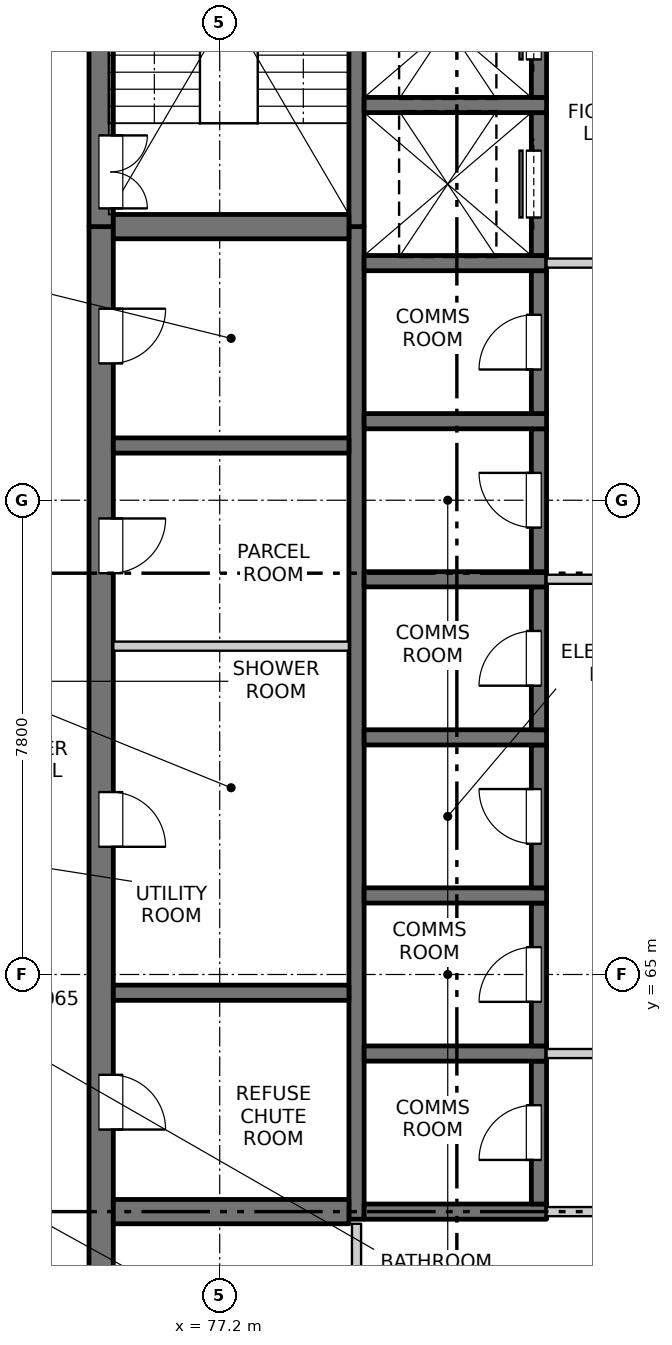
"""IFC4 building model, lengths in metres.
Left out: names, types, materials, properties, quantities, classifications, styles, units other than length and angle.
Written with IfcOpenShell. Run it as: python <this file> out.ifc"""

import sys

from ifc_helpers import new_model, si_unit, direction, frame, frame_2d, origin, place, context, subcontext, project, spatial, rectangle, extrude, element, fill, save


model = new_model("IFC4")
c1 = context("Model", 3, precision=1e-05, world=origin(), true_north=direction((0.0, 1.0)))
c2 = subcontext(c1, "Body", "Model", "MODEL_VIEW")
j1 = project(units=[si_unit("LENGTHUNIT", "METRE"), si_unit("PLANEANGLEUNIT", "RADIAN")], contexts=[c1])
p1 = place(None, origin())
s1 = spatial("IfcSite", under=j1, at=p1, CompositionType="ELEMENT")
p2 = place(p1, origin())
s2 = spatial("IfcBuilding", under=s1, at=p2, CompositionType="ELEMENT")
p3 = place(p2, frame((0.0, 0.0, 238.1)))
s3 = spatial("IfcBuildingStorey", under=s2, at=p3, CompositionType="ELEMENT", Elevation=238.1)
p4 = place(p3, frame((75.25, 55.05, -0.25), z_axis=(0.0, 0.0, 1.0), x_axis=(0.0, 1.0, 0.0)))
e1 = element("IfcWall", 1, at=p4, inside=s3, PredefinedType="SOLIDWALL", context=c2, shape_type="SweptSolid", body=[
    extrude(rectangle(XDim=22.25, YDim=0.4, at=frame_2d((11.125, 0.0))), origin(), (0.0, 0.0, 1.0), 3.35),
])
p5 = place(p4, frame((7.4, 0.0, 0.25)))
e2 = element("IfcOpeningElement", 2, at=p5, cuts=e1, PredefinedType="OPENING", context=c2, shape_type="SweptSolid", body=[
    extrude(rectangle(XDim=0.9, YDim=2.1, at=frame_2d((0.45, 1.05))), frame((0.0, 0.21, 0.0), z_axis=(0.0, -1.0, 0.0), x_axis=(1.0, 0.0, 0.0)), (0.0, 0.0, 1.0), 0.42),
])
p6 = place(p4, frame((12.05, 0.0, 0.25)))
e3 = element("IfcOpeningElement", 3, at=p6, cuts=e1, PredefinedType="OPENING", context=c2, shape_type="SweptSolid", body=[
    extrude(rectangle(XDim=0.9, YDim=2.1, at=frame_2d((0.45, 1.05))), frame((0.0, 0.21, 0.0), z_axis=(0.0, -1.0, 0.0), x_axis=(1.0, 0.0, 0.0)), (0.0, 0.0, 1.0), 0.42),
])
p7 = place(p4, frame((16.55, 0.0, 0.25)))
e4 = element("IfcOpeningElement", 4, at=p7, cuts=e1, PredefinedType="OPENING", context=c2, shape_type="SweptSolid", body=[
    extrude(rectangle(XDim=0.9, YDim=2.1, at=frame_2d((0.45, 1.05))), frame((0.0, 0.21, 0.0), z_axis=(0.0, -1.0, 0.0), x_axis=(1.0, 0.0, 0.0)), (0.0, 0.0, 1.0), 0.42),
])
p8 = place(p4, frame((20.0, 0.0, 0.25)))
e5 = element("IfcOpeningElement", 5, at=p8, cuts=e1, PredefinedType="OPENING", context=c2, shape_type="SweptSolid", body=[
    extrude(rectangle(XDim=0.9, YDim=2.1, at=frame_2d((0.45, 1.05))), frame((0.0, 0.21, 0.0), z_axis=(0.0, -1.0, 0.0), x_axis=(1.0, 0.0, 0.0)), (0.0, 0.0, 1.0), 0.42),
])
p9 = place(p3, frame((75.25, 77.3, -0.25), z_axis=(0.0, 0.0, 1.0), x_axis=(0.0, 1.0, 0.0)))
e6 = element("IfcWall", 6, at=p9, inside=s3, PredefinedType="SOLIDWALL", context=c2, shape_type="SweptSolid", body=[
    extrude(rectangle(XDim=7.4, YDim=0.4, at=frame_2d((3.7, 0.0))), origin(), (0.0, 0.0, 1.0), 3.35),
])
p10 = place(p9, frame((0.3, 0.0, 0.25)))
e7 = element("IfcOpeningElement", 7, at=p10, cuts=e6, PredefinedType="OPENING", context=c2, shape_type="SweptSolid", body=[
    extrude(rectangle(XDim=1.2, YDim=2.1, at=frame_2d((0.6, 1.05))), frame((0.0, 0.21, 0.0), z_axis=(0.0, -1.0, 0.0), x_axis=(1.0, 0.0, 0.0)), (0.0, 0.0, 1.0), 0.42),
])
p11 = place(p3, frame((79.45, 60.975, -0.25), z_axis=(0.0, 0.0, 1.0), x_axis=(0.0, 1.0, 0.0)))
e8 = element("IfcWall", 8, at=p11, inside=s3, PredefinedType="SOLIDWALL", context=c2, shape_type="SweptSolid", body=[
    extrude(rectangle(XDim=16.325, YDim=0.25, at=frame_2d((8.163, 0.0))), origin(), (0.0, 0.0, 1.0), 3.35),
])
p12 = place(p3, frame((79.45, 77.3, -0.25), z_axis=(0.0, 0.0, 1.0), x_axis=(0.0, 1.0, 0.0)))
e9 = element("IfcWall", 9, at=p12, inside=s3, PredefinedType="SOLIDWALL", context=c2, shape_type="SweptSolid", body=[
    extrude(rectangle(XDim=7.0, YDim=0.25, at=frame_2d((3.5, 0.0))), origin(), (0.0, 0.0, 1.0), 3.35),
])
p13 = place(p3, frame((79.575, 61.1, -0.25), z_axis=(0.0, 0.0, 1.0), x_axis=(1.0, 0.0, 0.0)))
e10 = element("IfcWall", 10, at=p13, inside=s3, PredefinedType="SOLIDWALL", context=c2, shape_type="SweptSolid", body=[
    extrude(rectangle(XDim=3.0, YDim=0.25, at=frame_2d((1.5, 0.0))), origin(), (0.0, 0.0, 1.0), 3.35),
])
p14 = place(p3, frame((82.45, 61.225, -0.25), z_axis=(0.0, 0.0, 1.0), x_axis=(0.0, 1.0, 0.0)))
e11 = element("IfcWall", 11, at=p14, inside=s3, PredefinedType="SOLIDWALL", context=c2, shape_type="SweptSolid", body=[
    extrude(rectangle(XDim=2.35, YDim=0.25, at=frame_2d((1.175, 0.0))), origin(), (0.0, 0.0, 1.0), 3.35),
])
p15 = place(p14, frame((0.725, 0.0, 0.25)))
e12 = element("IfcOpeningElement", 12, at=p15, cuts=e11, PredefinedType="OPENING", context=c2, shape_type="SweptSolid", body=[
    extrude(rectangle(XDim=0.9, YDim=2.1, at=frame_2d((0.45, 1.05))), frame((0.0, 0.135, 0.0), z_axis=(0.0, -1.0, 0.0), x_axis=(1.0, 0.0, 0.0)), (0.0, 0.0, 1.0), 0.27),
])
p16 = place(p3, frame((79.575, 63.7, -0.25), z_axis=(0.0, 0.0, 1.0), x_axis=(1.0, 0.0, 0.0)))
e13 = element("IfcWall", 13, at=p16, inside=s3, PredefinedType="SOLIDWALL", context=c2, shape_type="SweptSolid", body=[
    extrude(rectangle(XDim=3.0, YDim=0.25, at=frame_2d((1.5, 0.0))), origin(), (0.0, 0.0, 1.0), 3.35),
])
p17 = place(p3, frame((82.45, 63.825, -0.25), z_axis=(0.0, 0.0, 1.0), x_axis=(0.0, 1.0, 0.0)))
e14 = element("IfcWall", 14, at=p17, inside=s3, PredefinedType="SOLIDWALL", context=c2, shape_type="SweptSolid", body=[
    extrude(rectangle(XDim=2.35, YDim=0.25, at=frame_2d((1.175, 0.0))), origin(), (0.0, 0.0, 1.0), 3.35),
])
p18 = place(p17, frame((0.725, 0.0, 0.25)))
e15 = element("IfcOpeningElement", 15, at=p18, cuts=e14, PredefinedType="OPENING", context=c2, shape_type="SweptSolid", body=[
    extrude(rectangle(XDim=0.9, YDim=2.1, at=frame_2d((0.45, 1.05))), frame((0.0, 0.135, 0.0), z_axis=(0.0, -1.0, 0.0), x_axis=(1.0, 0.0, 0.0)), (0.0, 0.0, 1.0), 0.27),
])
p19 = place(p3, frame((79.575, 66.3, -0.25), z_axis=(0.0, 0.0, 1.0), x_axis=(1.0, 0.0, 0.0)))
e16 = element("IfcWall", 16, at=p19, inside=s3, PredefinedType="SOLIDWALL", context=c2, shape_type="SweptSolid", body=[
    extrude(rectangle(XDim=3.0, YDim=0.25, at=frame_2d((1.5, 0.0))), origin(), (0.0, 0.0, 1.0), 3.35),
])
p20 = place(p3, frame((82.45, 66.425, -0.25), z_axis=(0.0, 0.0, 1.0), x_axis=(0.0, 1.0, 0.0)))
e17 = element("IfcWall", 17, at=p20, inside=s3, PredefinedType="SOLIDWALL", context=c2, shape_type="SweptSolid", body=[
    extrude(rectangle(XDim=2.35, YDim=0.25, at=frame_2d((1.175, 0.0))), origin(), (0.0, 0.0, 1.0), 3.35),
])
p21 = place(p20, frame((0.725, 0.0, 0.25)))
e18 = element("IfcOpeningElement", 18, at=p21, cuts=e17, PredefinedType="OPENING", context=c2, shape_type="SweptSolid", body=[
    extrude(rectangle(XDim=0.9, YDim=2.1, at=frame_2d((0.45, 1.05))), frame((0.0, 0.135, 0.0), z_axis=(0.0, -1.0, 0.0), x_axis=(1.0, 0.0, 0.0)), (0.0, 0.0, 1.0), 0.27),
])
p22 = place(p3, frame((79.575, 68.9, -0.25), z_axis=(0.0, 0.0, 1.0), x_axis=(1.0, 0.0, 0.0)))
e19 = element("IfcWall", 19, at=p22, inside=s3, PredefinedType="SOLIDWALL", context=c2, shape_type="SweptSolid", body=[
    extrude(rectangle(XDim=3.0, YDim=0.25, at=frame_2d((1.5, 0.0))), origin(), (0.0, 0.0, 1.0), 3.35),
])
p23 = place(p3, frame((82.45, 69.025, -0.25), z_axis=(0.0, 0.0, 1.0), x_axis=(0.0, 1.0, 0.0)))
e20 = element("IfcWall", 20, at=p23, inside=s3, PredefinedType="SOLIDWALL", context=c2, shape_type="SweptSolid", body=[
    extrude(rectangle(XDim=2.35, YDim=0.25, at=frame_2d((1.175, 0.0))), origin(), (0.0, 0.0, 1.0), 3.35),
])
p24 = place(p23, frame((0.725, 0.0, 0.25)))
e21 = element("IfcOpeningElement", 21, at=p24, cuts=e20, PredefinedType="OPENING", context=c2, shape_type="SweptSolid", body=[
    extrude(rectangle(XDim=0.9, YDim=2.1, at=frame_2d((0.45, 1.05))), frame((0.0, 0.135, 0.0), z_axis=(0.0, -1.0, 0.0), x_axis=(1.0, 0.0, 0.0)), (0.0, 0.0, 1.0), 0.27),
])
p25 = place(p3, frame((79.575, 71.5, -0.25), z_axis=(0.0, 0.0, 1.0), x_axis=(1.0, 0.0, 0.0)))
e22 = element("IfcWall", 22, at=p25, inside=s3, PredefinedType="SOLIDWALL", context=c2, shape_type="SweptSolid", body=[
    extrude(rectangle(XDim=3.0, YDim=0.25, at=frame_2d((1.5, 0.0))), origin(), (0.0, 0.0, 1.0), 3.35),
])
p26 = place(p3, frame((82.45, 71.625, -0.25), z_axis=(0.0, 0.0, 1.0), x_axis=(0.0, 1.0, 0.0)))
e23 = element("IfcWall", 23, at=p26, inside=s3, PredefinedType="SOLIDWALL", context=c2, shape_type="SweptSolid", body=[
    extrude(rectangle(XDim=2.35, YDim=0.25, at=frame_2d((1.175, 0.0))), origin(), (0.0, 0.0, 1.0), 3.35),
])
p27 = place(p26, frame((0.725, 0.0, 0.25)))
e24 = element("IfcOpeningElement", 24, at=p27, cuts=e23, PredefinedType="OPENING", context=c2, shape_type="SweptSolid", body=[
    extrude(rectangle(XDim=0.9, YDim=2.1, at=frame_2d((0.45, 1.05))), frame((0.0, 0.135, 0.0), z_axis=(0.0, -1.0, 0.0), x_axis=(1.0, 0.0, 0.0)), (0.0, 0.0, 1.0), 0.27),
])
p28 = place(p3, frame((79.575, 74.1, -0.25), z_axis=(0.0, 0.0, 1.0), x_axis=(1.0, 0.0, 0.0)))
e25 = element("IfcWall", 25, at=p28, inside=s3, PredefinedType="SOLIDWALL", context=c2, shape_type="SweptSolid", body=[
    extrude(rectangle(XDim=3.0, YDim=0.25, at=frame_2d((1.5, 0.0))), origin(), (0.0, 0.0, 1.0), 3.35),
])
p29 = place(p3, frame((82.45, 74.225, -0.25), z_axis=(0.0, 0.0, 1.0), x_axis=(0.0, 1.0, 0.0)))
e26 = element("IfcWall", 26, at=p29, inside=s3, PredefinedType="SOLIDWALL", context=c2, shape_type="SweptSolid", body=[
    extrude(rectangle(XDim=2.35, YDim=0.25, at=frame_2d((1.175, 0.0))), origin(), (0.0, 0.0, 1.0), 3.35),
])
p30 = place(p29, frame((0.725, 0.0, 0.25)))
e27 = element("IfcOpeningElement", 27, at=p30, cuts=e26, PredefinedType="OPENING", context=c2, shape_type="SweptSolid", body=[
    extrude(rectangle(XDim=0.9, YDim=2.1, at=frame_2d((0.45, 1.05))), frame((0.0, 0.135, 0.0), z_axis=(0.0, -1.0, 0.0), x_axis=(1.0, 0.0, 0.0)), (0.0, 0.0, 1.0), 0.27),
])
p31 = place(p3, frame((79.575, 76.7, -0.25), z_axis=(0.0, 0.0, 1.0), x_axis=(1.0, 0.0, 0.0)))
e28 = element("IfcWall", 28, at=p31, inside=s3, PredefinedType="SOLIDWALL", context=c2, shape_type="SweptSolid", body=[
    extrude(rectangle(XDim=3.0, YDim=0.25, at=frame_2d((1.5, 0.0))), origin(), (0.0, 0.0, 1.0), 3.35),
])
p32 = place(p3, frame((82.45, 76.825, -0.25), z_axis=(0.0, 0.0, 1.0), x_axis=(0.0, 1.0, 0.0)))
e29 = element("IfcWall", 29, at=p32, inside=s3, PredefinedType="SOLIDWALL", context=c2, shape_type="SweptSolid", body=[
    extrude(rectangle(XDim=2.35, YDim=0.25, at=frame_2d((1.175, 0.0))), origin(), (0.0, 0.0, 1.0), 3.35),
])
p33 = place(p32, frame((0.625, 0.0, 0.25)))
e30 = element("IfcOpeningElement", 30, at=p33, cuts=e29, PredefinedType="OPENING", context=c2, shape_type="SweptSolid", body=[
    extrude(rectangle(XDim=1.1, YDim=2.1, at=frame_2d((0.55, 1.05))), frame((0.0, 0.135, 0.0), z_axis=(0.0, -1.0, 0.0), x_axis=(1.0, 0.0, 0.0)), (0.0, 0.0, 1.0), 0.27),
])
p34 = place(p3, frame((79.575, 79.3, -0.25), z_axis=(0.0, 0.0, 1.0), x_axis=(1.0, 0.0, 0.0)))
e31 = element("IfcWall", 31, at=p34, inside=s3, PredefinedType="SOLIDWALL", context=c2, shape_type="SweptSolid", body=[
    extrude(rectangle(XDim=3.0, YDim=0.25, at=frame_2d((1.5, 0.0))), origin(), (0.0, 0.0, 1.0), 3.35),
])
p35 = place(p3, frame((82.45, 79.425, -0.25), z_axis=(0.0, 0.0, 1.0), x_axis=(0.0, 1.0, 0.0)))
e32 = element("IfcWall", 32, at=p35, inside=s3, PredefinedType="SOLIDWALL", context=c2, shape_type="SweptSolid", body=[
    extrude(rectangle(XDim=2.35, YDim=0.25, at=frame_2d((1.175, 0.0))), origin(), (0.0, 0.0, 1.0), 3.35),
])
p36 = place(p35, frame((0.625, 0.0, 0.25)))
e33 = element("IfcOpeningElement", 33, at=p36, cuts=e32, PredefinedType="OPENING", context=c2, shape_type="SweptSolid", body=[
    extrude(rectangle(XDim=1.1, YDim=2.1, at=frame_2d((0.55, 1.05))), frame((0.0, 0.135, 0.0), z_axis=(0.0, -1.0, 0.0), x_axis=(1.0, 0.0, 0.0)), (0.0, 0.0, 1.0), 0.27),
])
p37 = place(p3, frame((75.45, 61.1, -0.25), z_axis=(0.0, 0.0, 1.0), x_axis=(1.0, 0.0, 0.0)))
e34 = element("IfcWall", 34, at=p37, inside=s3, PredefinedType="SOLIDWALL", context=c2, shape_type="SweptSolid", body=[
    extrude(rectangle(XDim=3.875, YDim=0.4, at=frame_2d((1.938, 0.0))), origin(), (0.0, 0.0, 1.0), 3.35),
])
for number, where, z_axis, x_axis in (
    (35, (75.45, 64.7, -0.25), (0.0, 0.0, 1.0), (1.0, 0.0, 0.0)),
    (36, (75.45, 73.7, -0.25), (0.0, 0.0, 1.0), (1.0, 0.0, 0.0)),
):
    element("IfcWall", number, at=place(p3, frame(where, z_axis=z_axis, x_axis=x_axis)), inside=s3, PredefinedType="SOLIDWALL", context=c2, shape_type="SweptSolid", body=[
        extrude(rectangle(XDim=3.875, YDim=0.25, at=frame_2d((1.938, 0.0))), origin(), (0.0, 0.0, 1.0), 3.35),
    ])
p38 = place(p3, frame((75.45, 77.3, -0.25), z_axis=(0.0, 0.0, 1.0), x_axis=(1.0, 0.0, 0.0)))
e37 = element("IfcWall", 37, at=p38, inside=s3, PredefinedType="SOLIDWALL", context=c2, shape_type="SweptSolid", body=[
    extrude(rectangle(XDim=3.875, YDim=0.4, at=frame_2d((1.938, 0.0))), origin(), (0.0, 0.0, 1.0), 3.35),
])
p39 = place(p3, frame((82.575, 61.1, 0.0), z_axis=(0.0, 0.0, 1.0), x_axis=(1.0, 0.0, 0.0)))
e38 = element("IfcWall", 38, at=p39, inside=s3, PredefinedType="PARTITIONING", context=c2, shape_type="SweptSolid", body=[
    extrude(rectangle(XDim=4.85, YDim=0.15, at=frame_2d((2.425, 0.0))), origin(), (0.0, 0.0, 1.0), 3.1),
])
p40 = place(p39, frame((1.525, 0.0, 0.0)))
e39 = element("IfcOpeningElement", 39, at=p40, cuts=e38, PredefinedType="OPENING", context=c2, shape_type="SweptSolid", body=[
    extrude(rectangle(XDim=1.8, YDim=2.1, at=frame_2d((0.9, 1.05))), frame((0.0, 0.085, 0.0), z_axis=(0.0, -1.0, 0.0), x_axis=(1.0, 0.0, 0.0)), (0.0, 0.0, 1.0), 0.17),
])
p41 = place(p3, frame((82.575, 63.7, 0.0), z_axis=(0.0, 0.0, 1.0), x_axis=(1.0, 0.0, 0.0)))
e40 = element("IfcWall", 40, at=p41, inside=s3, PredefinedType="PARTITIONING", context=c2, shape_type="SweptSolid", body=[
    extrude(rectangle(XDim=4.85, YDim=0.15, at=frame_2d((2.425, 0.0))), origin(), (0.0, 0.0, 1.0), 3.1),
])
p42 = place(p41, frame((1.525, 0.0, 0.0)))
e41 = element("IfcOpeningElement", 41, at=p42, cuts=e40, PredefinedType="OPENING", context=c2, shape_type="SweptSolid", body=[
    extrude(rectangle(XDim=1.8, YDim=2.1, at=frame_2d((0.9, 1.05))), frame((0.0, 0.085, 0.0), z_axis=(0.0, -1.0, 0.0), x_axis=(1.0, 0.0, 0.0)), (0.0, 0.0, 1.0), 0.17),
])
p43 = place(p3, frame((75.45, 70.4, 0.0), z_axis=(0.0, 0.0, 1.0), x_axis=(1.0, 0.0, 0.0)))
e42 = element("IfcWall", 42, at=p43, inside=s3, PredefinedType="PARTITIONING", context=c2, shape_type="SweptSolid", body=[
    extrude(rectangle(XDim=3.875, YDim=0.15, at=frame_2d((1.938, 0.0))), origin(), (0.0, 0.0, 1.0), 3.1),
])
p44 = place(p3, frame((82.575, 71.5, 0.0), z_axis=(0.0, 0.0, 1.0), x_axis=(1.0, 0.0, 0.0)))
e43 = element("IfcWall", 43, at=p44, inside=s3, PredefinedType="PARTITIONING", context=c2, shape_type="SweptSolid", body=[
    extrude(rectangle(XDim=4.85, YDim=0.15, at=frame_2d((2.425, 0.0))), origin(), (0.0, 0.0, 1.0), 3.1),
])
p45 = place(p44, frame((1.525, 0.0, 0.0)))
e44 = element("IfcOpeningElement", 44, at=p45, cuts=e43, PredefinedType="OPENING", context=c2, shape_type="SweptSolid", body=[
    extrude(rectangle(XDim=1.8, YDim=2.1, at=frame_2d((0.9, 1.05))), frame((0.0, 0.085, 0.0), z_axis=(0.0, -1.0, 0.0), x_axis=(1.0, 0.0, 0.0)), (0.0, 0.0, 1.0), 0.17),
])
p46 = place(p3, frame((82.575, 76.7, 0.0), z_axis=(0.0, 0.0, 1.0), x_axis=(1.0, 0.0, 0.0)))
e45 = element("IfcWall", 45, at=p46, inside=s3, PredefinedType="PARTITIONING", context=c2, shape_type="SweptSolid", body=[
    extrude(rectangle(XDim=4.85, YDim=0.15, at=frame_2d((2.425, 0.0))), origin(), (0.0, 0.0, 1.0), 3.1),
])
p47 = place(p46, frame((1.525, 0.0, 0.0)))
e46 = element("IfcOpeningElement", 46, at=p47, cuts=e45, PredefinedType="OPENING", context=c2, shape_type="SweptSolid", body=[
    extrude(rectangle(XDim=1.8, YDim=2.1, at=frame_2d((0.9, 1.05))), frame((0.0, 0.085, 0.0), z_axis=(0.0, -1.0, 0.0), x_axis=(1.0, 0.0, 0.0)), (0.0, 0.0, 1.0), 0.17),
])
p48 = place(p3, frame((79.45, 55.45, 0.0), z_axis=(0.0, 0.0, 1.0), x_axis=(0.0, 1.0, 0.0)))
e47 = element("IfcWall", 47, at=p48, inside=s3, PredefinedType="PARTITIONING", context=c2, shape_type="SweptSolid", body=[
    extrude(rectangle(XDim=5.45, YDim=0.15, at=frame_2d((2.725, 0.0))), origin(), (0.0, 0.0, 1.0), 3.1),
])
p49 = place(p48, frame((2.25, 0.0, 0.0)))
e48 = element("IfcOpeningElement", 48, at=p49, cuts=e47, PredefinedType="OPENING", context=c2, shape_type="SweptSolid", body=[
    extrude(rectangle(XDim=0.9, YDim=2.1, at=frame_2d((0.45, 1.05))), frame((0.0, 0.085, 0.0), z_axis=(0.0, -1.0, 0.0), x_axis=(1.0, 0.0, 0.0)), (0.0, 0.0, 1.0), 0.17),
])
p50 = place(p15, origin())
e49 = element("IfcDoor", 49, at=p50, inside=s3, OperationType="SINGLE_SWING_LEFT", PredefinedType="DOOR", context=c2, shape_type="SweptSolid", body=[
    extrude(rectangle(XDim=0.9, YDim=2.1, at=frame_2d((0.45, 1.05))), frame((0.0, 0.11, 0.0), z_axis=(0.0, -1.0, 0.0), x_axis=(1.0, 0.0, 0.0)), (0.0, 0.0, 1.0), 0.05),
])
fill(e12, e49)
p51 = place(p5, origin())
e50 = element("IfcDoor", 50, at=p51, inside=s3, OperationType="SINGLE_SWING_RIGHT", PredefinedType="DOOR", context=c2, shape_type="SweptSolid", body=[
    extrude(rectangle(XDim=0.9, YDim=2.1, at=frame_2d((0.45, 1.05))), frame((0.0, -0.135, 0.0), z_axis=(0.0, -1.0, 0.0), x_axis=(1.0, 0.0, 0.0)), (0.0, 0.0, 1.0), 0.05),
])
fill(e2, e50)
p52 = place(p18, origin())
e51 = element("IfcDoor", 51, at=p52, inside=s3, OperationType="SINGLE_SWING_LEFT", PredefinedType="DOOR", context=c2, shape_type="SweptSolid", body=[
    extrude(rectangle(XDim=0.9, YDim=2.1, at=frame_2d((0.45, 1.05))), frame((0.0, 0.11, 0.0), z_axis=(0.0, -1.0, 0.0), x_axis=(1.0, 0.0, 0.0)), (0.0, 0.0, 1.0), 0.05),
])
fill(e15, e51)
p53 = place(p6, origin())
e52 = element("IfcDoor", 52, at=p53, inside=s3, OperationType="SINGLE_SWING_RIGHT", PredefinedType="DOOR", context=c2, shape_type="SweptSolid", body=[
    extrude(rectangle(XDim=0.9, YDim=2.1, at=frame_2d((0.45, 1.05))), frame((0.0, -0.135, 0.0), z_axis=(0.0, -1.0, 0.0), x_axis=(1.0, 0.0, 0.0)), (0.0, 0.0, 1.0), 0.05),
])
fill(e3, e52)
p54 = place(p21, origin())
e53 = element("IfcDoor", 53, at=p54, inside=s3, OperationType="SINGLE_SWING_RIGHT", PredefinedType="DOOR", context=c2, shape_type="SweptSolid", body=[
    extrude(rectangle(XDim=0.9, YDim=2.1, at=frame_2d((0.45, 1.05))), frame((0.0, 0.11, 0.0), z_axis=(0.0, -1.0, 0.0), x_axis=(1.0, 0.0, 0.0)), (0.0, 0.0, 1.0), 0.05),
])
fill(e18, e53)
p55 = place(p24, origin())
e54 = element("IfcDoor", 54, at=p55, inside=s3, OperationType="SINGLE_SWING_LEFT", PredefinedType="DOOR", context=c2, shape_type="SweptSolid", body=[
    extrude(rectangle(XDim=0.9, YDim=2.1, at=frame_2d((0.45, 1.05))), frame((0.0, 0.11, 0.0), z_axis=(0.0, -1.0, 0.0), x_axis=(1.0, 0.0, 0.0)), (0.0, 0.0, 1.0), 0.05),
])
fill(e21, e54)
p56 = place(p7, origin())
e55 = element("IfcDoor", 55, at=p56, inside=s3, OperationType="SINGLE_SWING_LEFT", PredefinedType="DOOR", context=c2, shape_type="SweptSolid", body=[
    extrude(rectangle(XDim=0.9, YDim=2.1, at=frame_2d((0.45, 1.05))), frame((0.0, -0.135, 0.0), z_axis=(0.0, -1.0, 0.0), x_axis=(1.0, 0.0, 0.0)), (0.0, 0.0, 1.0), 0.05),
])
fill(e4, e55)
p57 = place(p27, origin())
e56 = element("IfcDoor", 56, at=p57, inside=s3, OperationType="SINGLE_SWING_RIGHT", PredefinedType="DOOR", context=c2, shape_type="SweptSolid", body=[
    extrude(rectangle(XDim=0.9, YDim=2.1, at=frame_2d((0.45, 1.05))), frame((0.0, 0.11, 0.0), z_axis=(0.0, -1.0, 0.0), x_axis=(1.0, 0.0, 0.0)), (0.0, 0.0, 1.0), 0.05),
])
fill(e24, e56)
p58 = place(p30, origin())
e57 = element("IfcDoor", 57, at=p58, inside=s3, OperationType="SINGLE_SWING_LEFT", PredefinedType="DOOR", context=c2, shape_type="SweptSolid", body=[
    extrude(rectangle(XDim=0.9, YDim=2.1, at=frame_2d((0.45, 1.05))), frame((0.0, 0.11, 0.0), z_axis=(0.0, -1.0, 0.0), x_axis=(1.0, 0.0, 0.0)), (0.0, 0.0, 1.0), 0.05),
])
fill(e27, e57)
p59 = place(p8, origin())
e58 = element("IfcDoor", 58, at=p59, inside=s3, OperationType="SINGLE_SWING_LEFT", PredefinedType="DOOR", context=c2, shape_type="SweptSolid", body=[
    extrude(rectangle(XDim=0.9, YDim=2.1, at=frame_2d((0.45, 1.05))), frame((0.0, -0.135, 0.0), z_axis=(0.0, -1.0, 0.0), x_axis=(1.0, 0.0, 0.0)), (0.0, 0.0, 1.0), 0.05),
])
fill(e5, e58)
p60 = place(p33, origin())
e59 = element("IfcDoor", 59, at=p60, inside=s3, OperationType="SLIDING_TO_LEFT", PredefinedType="DOOR", context=c2, shape_type="SweptSolid", body=[
    extrude(rectangle(XDim=1.1, YDim=2.1, at=frame_2d((0.55, 1.05))), frame((0.0, 0.11, 0.0), z_axis=(0.0, -1.0, 0.0), x_axis=(1.0, 0.0, 0.0)), (0.0, 0.0, 1.0), 0.05),
])
fill(e30, e59)
p61 = place(p10, origin())
e60 = element("IfcDoor", 60, at=p61, inside=s3, OperationType="DOUBLE_DOOR_SINGLE_SWING", PredefinedType="DOOR", context=c2, shape_type="SweptSolid", body=[
    extrude(rectangle(XDim=1.2, YDim=2.1, at=frame_2d((0.6, 1.05))), frame((0.0, -0.135, 0.0), z_axis=(0.0, -1.0, 0.0), x_axis=(1.0, 0.0, 0.0)), (0.0, 0.0, 1.0), 0.05),
])
fill(e7, e60)
p62 = place(p36, origin())
e61 = element("IfcDoor", 61, at=p62, inside=s3, OperationType="SLIDING_TO_LEFT", PredefinedType="DOOR", context=c2, shape_type="SweptSolid", body=[
    extrude(rectangle(XDim=1.1, YDim=2.1, at=frame_2d((0.55, 1.05))), frame((0.0, 0.11, 0.0), z_axis=(0.0, -1.0, 0.0), x_axis=(1.0, 0.0, 0.0)), (0.0, 0.0, 1.0), 0.05),
])
fill(e33, e61)
save(model, sys.argv[1])
